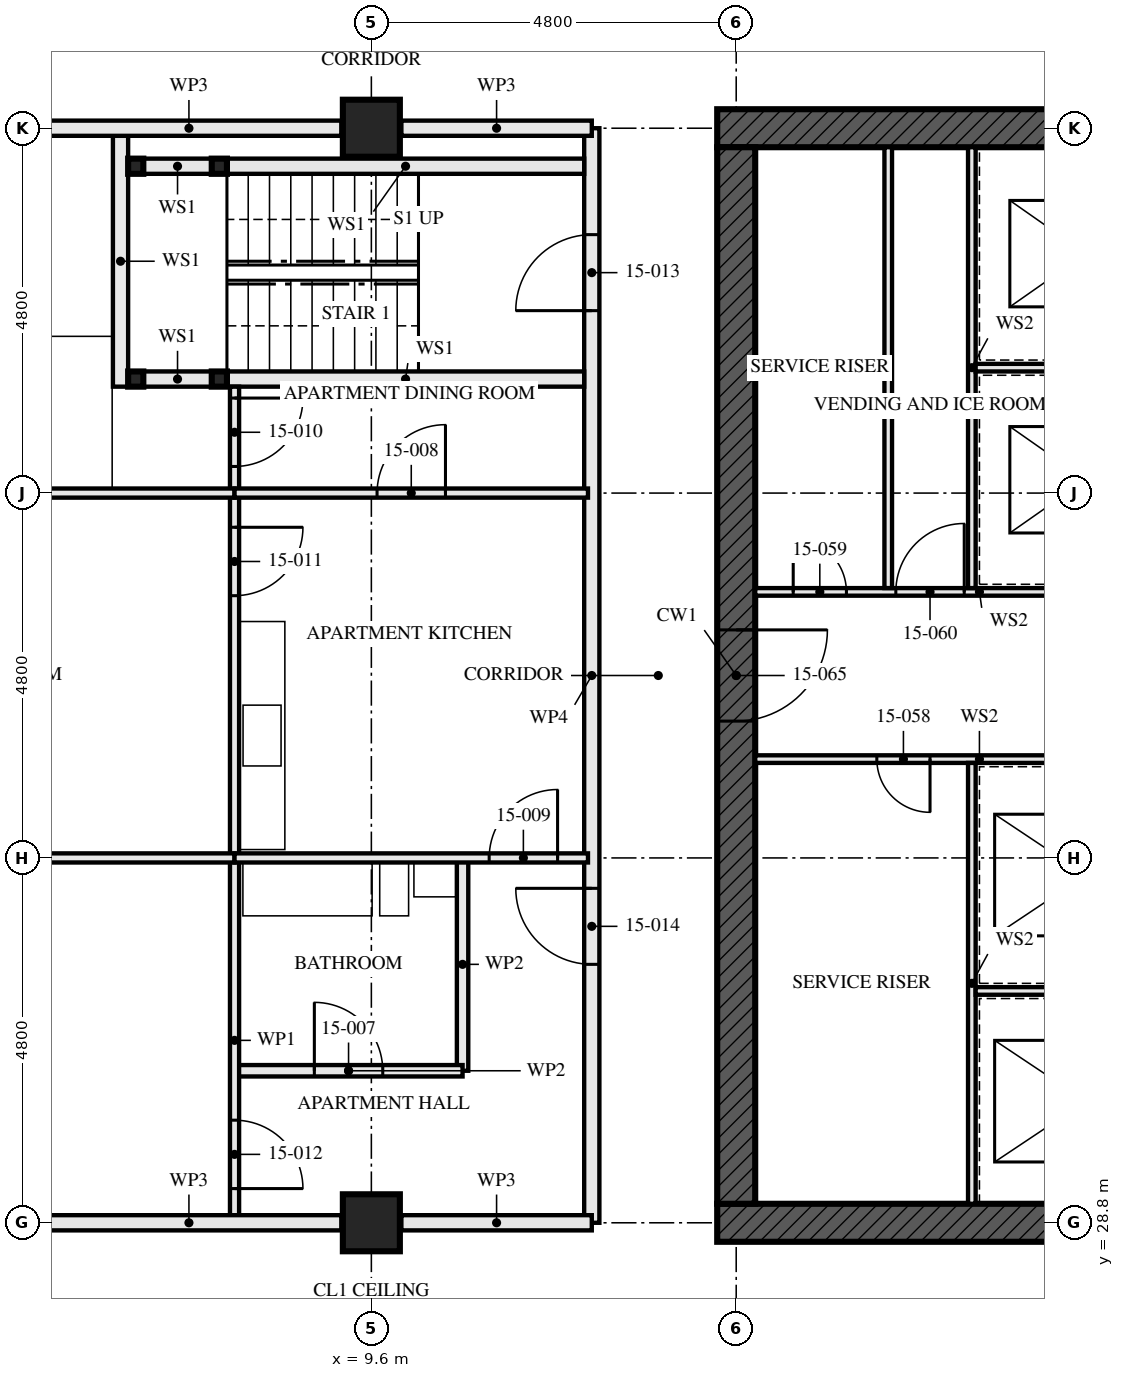
"""IFC4 building model, lengths in metres.
Left out: names, types, materials, properties, quantities, classifications, styles, units other than length and angle.
Written with IfcOpenShell. Run it as: python <this file> out.ifc"""

import sys

from ifc_helpers import new_model, si_unit, direction, frame, frame_2d, origin, origin_2d, place, context, subcontext, project, spatial, rectangle, hollow_rectangle, extrude, element, fill, save


model = new_model("IFC4")
c1 = context("Model", 3, precision=1e-05, world=origin(), true_north=direction((0.0, 1.0)))
c2 = subcontext(c1, "Body", "Model", "MODEL_VIEW")
j1 = project(units=[si_unit("LENGTHUNIT", "METRE"), si_unit("PLANEANGLEUNIT", "RADIAN")], contexts=[c1])
p1 = place(None, origin())
s1 = spatial("IfcSite", under=j1, at=p1, CompositionType="ELEMENT")
p2 = place(p1, origin())
s2 = spatial("IfcBuilding", under=s1, at=p2, CompositionType="ELEMENT")
p3 = place(p2, frame((0.0, 0.0, 58.5)))
s3 = spatial("IfcBuildingStorey", under=s2, at=p3, CompositionType="ELEMENT", Elevation=58.5)
for number, where, z_axis, x_axis in (
    (1, (9.6, 28.8, 0.0), (0.0, 0.0, 1.0), (0.0, 1.0, 0.0)),
    (2, (9.6, 43.2, 0.0), (0.0, 0.0, 1.0), (0.0, 1.0, 0.0)),
):
    element("IfcColumn", number, at=place(p3, frame(where, z_axis=z_axis, x_axis=x_axis)), inside=s3, PredefinedType="COLUMN", context=c2, shape_type="SweptSolid", body=[
        extrude(hollow_rectangle(XDim=0.75, YDim=0.75, WallThickness=0.08, at=origin_2d()), origin(), (0.0, 0.0, 1.0), 3.5),
    ])
p4 = place(p3, frame((14.15, 28.8, -0.17), z_axis=(0.0, 0.0, 1.0), x_axis=(1.0, 0.0, 0.0)))
e3 = element("IfcWall", 3, at=p4, inside=s3, PredefinedType="SHEAR", context=c2, shape_type="SweptSolid", body=[
    extrude(rectangle(XDim=14.9, YDim=0.5, at=frame_2d((7.45, 0.0))), origin(), (0.0, 0.0, 1.0), 3.5),
])
p5 = place(p4, frame((6.85, 0.0, 0.17)))
e4 = element("IfcOpeningElement", 4, at=p5, cuts=e3, PredefinedType="OPENING", context=c2, shape_type="SweptSolid", body=[
    extrude(rectangle(XDim=1.2, YDim=2.1, at=frame_2d((0.6, 1.05))), frame((0.0, 0.26, 0.0), z_axis=(0.0, -1.0, 0.0), x_axis=(1.0, 0.0, 0.0)), (0.0, 0.0, 1.0), 0.521),
])
p6 = place(p3, frame((29.05, 43.2, -0.17), z_axis=(0.0, 0.0, 1.0), x_axis=(-1.0, 0.0, 0.0)))
e5 = element("IfcWall", 5, at=p6, inside=s3, PredefinedType="SHEAR", context=c2, shape_type="SweptSolid", body=[
    extrude(rectangle(XDim=14.9, YDim=0.5, at=frame_2d((7.45, 0.0))), origin(), (0.0, 0.0, 1.0), 3.5),
])
p7 = place(p6, frame((6.85, 0.0, 0.17)))
e6 = element("IfcOpeningElement", 6, at=p7, cuts=e5, PredefinedType="OPENING", context=c2, shape_type="SweptSolid", body=[
    extrude(rectangle(XDim=1.2, YDim=2.1, at=frame_2d((0.6, 1.05))), frame((0.0, 0.26, 0.0), z_axis=(0.0, -1.0, 0.0), x_axis=(1.0, 0.0, 0.0)), (0.0, 0.0, 1.0), 0.521),
])
p8 = place(p3, frame((14.4, 42.95, -0.17), z_axis=(0.0, 0.0, 1.0), x_axis=(0.0, -1.0, 0.0)))
e7 = element("IfcWall", 7, at=p8, inside=s3, PredefinedType="SHEAR", context=c2, shape_type="SweptSolid", body=[
    extrude(rectangle(XDim=13.9, YDim=0.5, at=frame_2d((6.95, 0.0))), origin(), (0.0, 0.0, 1.0), 3.5),
])
p9 = place(p8, frame((6.35, 0.0, 0.17)))
e8 = element("IfcOpeningElement", 8, at=p9, cuts=e7, PredefinedType="OPENING", context=c2, shape_type="SweptSolid", body=[
    extrude(rectangle(XDim=1.2, YDim=2.1, at=frame_2d((0.6, 1.05))), frame((0.0, 0.26, 0.0), z_axis=(0.0, -1.0, 0.0), x_axis=(1.0, 0.0, 0.0)), (0.0, 0.0, 1.0), 0.521),
])
for number, where, z_axis, x_axis in (
    (9, (6.5, 42.7, 0.0), (0.0, 0.0, 1.0), (1.0, 0.0, 0.0)),
    (10, (6.5, 39.9, 0.0), (0.0, 0.0, 1.0), (1.0, 0.0, 0.0)),
    (11, (7.6, 42.7, 0.0), (0.0, 0.0, 1.0), (1.0, 0.0, 0.0)),
    (12, (7.6, 39.9, 0.0), (0.0, 0.0, 1.0), (1.0, 0.0, 0.0)),
):
    element("IfcColumn", number, at=place(p3, frame(where, z_axis=z_axis, x_axis=x_axis)), inside=s3, PredefinedType="COLUMN", context=c2, shape_type="SweptSolid", body=[
        extrude(hollow_rectangle(XDim=0.2, YDim=0.2, WallThickness=0.008, at=origin_2d()), origin(), (0.0, 0.0, 1.0), 3.33),
    ])
p10 = place(p3, frame((6.6, 42.7, 0.0), z_axis=(0.0, 0.0, 1.0), x_axis=(1.0, 0.0, 0.0)))
e13 = element("IfcWall", 13, at=p10, inside=s3, PredefinedType="SOLIDWALL", context=c2, shape_type="SweptSolid", body=[
    extrude(rectangle(XDim=0.9, YDim=0.2, at=frame_2d((0.45, 0.0))), origin(), (0.0, 0.0, 1.0), 2.99),
])
p11 = place(p3, frame((7.7, 42.7, 0.0), z_axis=(0.0, 0.0, 1.0), x_axis=(1.0, 0.0, 0.0)))
e14 = element("IfcWall", 14, at=p11, inside=s3, PredefinedType="SOLIDWALL", context=c2, shape_type="SweptSolid", body=[
    extrude(rectangle(XDim=4.7, YDim=0.2, at=frame_2d((2.35, 0.0))), origin(), (0.0, 0.0, 1.0), 2.99),
])
p12 = place(p3, frame((6.6, 39.9, 0.0), z_axis=(0.0, 0.0, 1.0), x_axis=(1.0, 0.0, 0.0)))
e15 = element("IfcWall", 15, at=p12, inside=s3, PredefinedType="SOLIDWALL", context=c2, shape_type="SweptSolid", body=[
    extrude(rectangle(XDim=0.9, YDim=0.2, at=frame_2d((0.45, 0.0))), origin(), (0.0, 0.0, 1.0), 2.99),
])
p13 = place(p3, frame((7.7, 39.9, 0.0), z_axis=(0.0, 0.0, 1.0), x_axis=(1.0, 0.0, 0.0)))
e16 = element("IfcWall", 16, at=p13, inside=s3, PredefinedType="SOLIDWALL", context=c2, shape_type="SweptSolid", body=[
    extrude(rectangle(XDim=4.7, YDim=0.2, at=frame_2d((2.35, 0.0))), origin(), (0.0, 0.0, 1.0), 2.99),
])
p14 = place(p3, frame((6.3, 43.1, 0.0), z_axis=(0.0, 0.0, 1.0), x_axis=(0.0, -1.0, 0.0)))
e17 = element("IfcWall", 17, at=p14, inside=s3, PredefinedType="SOLIDWALL", context=c2, shape_type="SweptSolid", body=[
    extrude(rectangle(XDim=3.3, YDim=0.2, at=frame_2d((1.65, 0.0))), origin(), (0.0, 0.0, 1.0), 3.33),
])
p15 = place(p3, frame((7.8, 30.8, 0.0), z_axis=(0.0, 0.0, 1.0), x_axis=(1.0, 0.0, 0.0)))
e18 = element("IfcWall", 18, at=p15, inside=s3, PredefinedType="PARTITIONING", context=c2, shape_type="SweptSolid", body=[
    extrude(rectangle(XDim=3.0, YDim=0.15, at=frame_2d((1.5, 0.0))), origin(), (0.0, 0.0, 1.0), 3.33),
])
p16 = place(p15, frame((1.05, 0.0, 0.0)))
e19 = element("IfcOpeningElement", 19, at=p16, cuts=e18, PredefinedType="OPENING", context=c2, shape_type="SweptSolid", body=[
    extrude(rectangle(XDim=0.9, YDim=2.1, at=frame_2d((0.45, 1.05))), frame((0.0, 0.085, 0.0), z_axis=(0.0, -1.0, 0.0), x_axis=(1.0, 0.0, 0.0)), (0.0, 0.0, 1.0), 0.171),
])
p17 = place(p3, frame((10.8, 33.6, 0.0), z_axis=(0.0, 0.0, 1.0), x_axis=(0.0, -1.0, 0.0)))
e20 = element("IfcWall", 20, at=p17, inside=s3, PredefinedType="PARTITIONING", context=c2, shape_type="SweptSolid", body=[
    extrude(rectangle(XDim=2.8, YDim=0.15, at=frame_2d((1.4, 0.0))), origin(), (0.0, 0.0, 1.0), 3.33),
])
p18 = place(p3, frame((7.8, 38.4, 0.0), z_axis=(0.0, 0.0, 1.0), x_axis=(1.0, 0.0, 0.0)))
e21 = element("IfcWall", 21, at=p18, inside=s3, PredefinedType="PARTITIONING", context=c2, shape_type="SweptSolid", body=[
    extrude(rectangle(XDim=4.65, YDim=0.12, at=frame_2d((2.325, 0.0))), origin(), (0.0, 0.0, 1.0), 2.55),
])
p19 = place(p18, frame((1.875, 0.0, 0.0)))
e22 = element("IfcOpeningElement", 22, at=p19, cuts=e21, PredefinedType="OPENING", context=c2, shape_type="SweptSolid", body=[
    extrude(rectangle(XDim=0.9, YDim=2.1, at=frame_2d((0.45, 1.05))), frame((0.0, 0.071, 0.0), z_axis=(0.0, -1.0, 0.0), x_axis=(1.0, 0.0, 0.0)), (0.0, 0.0, 1.0), 0.141),
])
p20 = place(p3, frame((7.8, 33.6, 0.0), z_axis=(0.0, 0.0, 1.0), x_axis=(1.0, 0.0, 0.0)))
e23 = element("IfcWall", 23, at=p20, inside=s3, PredefinedType="PARTITIONING", context=c2, shape_type="SweptSolid", body=[
    extrude(rectangle(XDim=4.65, YDim=0.12, at=frame_2d((2.325, 0.0))), origin(), (0.0, 0.0, 1.0), 2.55),
])
p21 = place(p20, frame((3.35, 0.0, 0.0)))
e24 = element("IfcOpeningElement", 24, at=p21, cuts=e23, PredefinedType="OPENING", context=c2, shape_type="SweptSolid", body=[
    extrude(rectangle(XDim=0.9, YDim=2.1, at=frame_2d((0.45, 1.05))), frame((0.0, 0.071, 0.0), z_axis=(0.0, -1.0, 0.0), x_axis=(1.0, 0.0, 0.0)), (0.0, 0.0, 1.0), 0.141),
])
p22 = place(p3, frame((7.8, 39.8, 0.0), z_axis=(0.0, 0.0, 1.0), x_axis=(0.0, -1.0, 0.0)))
e25 = element("IfcWall", 25, at=p22, inside=s3, PredefinedType="PARTITIONING", context=c2, shape_type="SweptSolid", body=[
    extrude(rectangle(XDim=1.4, YDim=0.12, at=frame_2d((0.7, 0.0))), origin(), (0.0, 0.0, 1.0), 3.33),
])
p23 = place(p22, frame((0.15, 0.0, 0.0)))
e26 = element("IfcOpeningElement", 26, at=p23, cuts=e25, PredefinedType="OPENING", context=c2, shape_type="SweptSolid", body=[
    extrude(rectangle(XDim=0.9, YDim=2.1, at=frame_2d((0.45, 1.05))), frame((0.0, 0.071, 0.0), z_axis=(0.0, -1.0, 0.0), x_axis=(1.0, 0.0, 0.0)), (0.0, 0.0, 1.0), 0.141),
])
p24 = place(p3, frame((7.8, 38.4, 0.0), z_axis=(0.0, 0.0, 1.0), x_axis=(0.0, -1.0, 0.0)))
e27 = element("IfcWall", 27, at=p24, inside=s3, PredefinedType="PARTITIONING", context=c2, shape_type="SweptSolid", body=[
    extrude(rectangle(XDim=4.8, YDim=0.12, at=frame_2d((2.4, 0.0))), origin(), (0.0, 0.0, 1.0), 3.33),
])
p25 = place(p24, frame((0.45, 0.0, 0.0)))
e28 = element("IfcOpeningElement", 28, at=p25, cuts=e27, PredefinedType="OPENING", context=c2, shape_type="SweptSolid", body=[
    extrude(rectangle(XDim=0.9, YDim=2.1, at=frame_2d((0.45, 1.05))), frame((0.0, 0.071, 0.0), z_axis=(0.0, -1.0, 0.0), x_axis=(1.0, 0.0, 0.0)), (0.0, 0.0, 1.0), 0.141),
])
p26 = place(p3, frame((7.8, 33.6, 0.0), z_axis=(0.0, 0.0, 1.0), x_axis=(0.0, -1.0, 0.0)))
e29 = element("IfcWall", 29, at=p26, inside=s3, PredefinedType="PARTITIONING", context=c2, shape_type="SweptSolid", body=[
    extrude(rectangle(XDim=4.8, YDim=0.12, at=frame_2d((2.4, 0.0))), origin(), (0.0, 0.0, 1.0), 3.33),
])
p27 = place(p26, frame((3.45, 0.0, 0.0)))
e30 = element("IfcOpeningElement", 30, at=p27, cuts=e29, PredefinedType="OPENING", context=c2, shape_type="SweptSolid", body=[
    extrude(rectangle(XDim=0.9, YDim=2.1, at=frame_2d((0.45, 1.05))), frame((0.0, 0.071, 0.0), z_axis=(0.0, -1.0, 0.0), x_axis=(1.0, 0.0, 0.0)), (0.0, 0.0, 1.0), 0.141),
])
for number, where, z_axis, x_axis in (
    (31, (0.395, 38.4, 0.0), (0.0, 0.0, 1.0), (1.0, 0.0, 0.0)),
    (32, (0.395, 33.6, 0.0), (0.0, 0.0, 1.0), (1.0, 0.0, 0.0)),
):
    element("IfcWall", number, at=place(p3, frame(where, z_axis=z_axis, x_axis=x_axis)), inside=s3, PredefinedType="PARTITIONING", context=c2, shape_type="SweptSolid", body=[
        extrude(rectangle(XDim=7.405, YDim=0.12, at=frame_2d((3.703, 0.0))), origin(), (0.0, 0.0, 1.0), 2.55),
    ])
p28 = place(p3, frame((12.5, 43.2, 0.0), z_axis=(0.0, 0.0, 1.0), x_axis=(0.0, -1.0, 0.0)))
e33 = element("IfcWall", 33, at=p28, inside=s3, PredefinedType="PARTITIONING", context=c2, shape_type="SweptSolid", body=[
    extrude(rectangle(XDim=14.4, YDim=0.2, at=frame_2d((7.2, 0.0))), origin(), (0.0, 0.0, 1.0), 2.55),
])
p29 = place(p28, frame((1.4, 0.0, 0.0)))
e34 = element("IfcOpeningElement", 34, at=p29, cuts=e33, PredefinedType="OPENING", context=c2, shape_type="SweptSolid", body=[
    extrude(rectangle(XDim=1.0, YDim=2.1, at=frame_2d((0.5, 1.05))), frame((0.0, 0.111, 0.0), z_axis=(0.0, -1.0, 0.0), x_axis=(1.0, 0.0, 0.0)), (0.0, 0.0, 1.0), 0.221),
])
p30 = place(p28, frame((10.0, 0.0, 0.0)))
e35 = element("IfcOpeningElement", 35, at=p30, cuts=e33, PredefinedType="OPENING", context=c2, shape_type="SweptSolid", body=[
    extrude(rectangle(XDim=1.0, YDim=2.1, at=frame_2d((0.5, 1.05))), frame((0.0, 0.111, 0.0), z_axis=(0.0, -1.0, 0.0), x_axis=(1.0, 0.0, 0.0)), (0.0, 0.0, 1.0), 0.221),
])
p31 = place(p3, frame((16.4, 37.15, 0.0), z_axis=(0.0, 0.0, 1.0), x_axis=(0.0, 1.0, 0.0)))
e36 = element("IfcWall", 36, at=p31, inside=s3, PredefinedType="SOLIDWALL", context=c2, shape_type="SweptSolid", body=[
    extrude(rectangle(XDim=5.8, YDim=0.1, at=frame_2d((2.9, 0.0))), origin(), (0.0, 0.0, 1.0), 3.33),
])
p32 = place(p3, frame((14.65, 34.9, 0.0), z_axis=(0.0, 0.0, 1.0), x_axis=(1.0, 0.0, 0.0)))
e37 = element("IfcWall", 37, at=p32, inside=s3, PredefinedType="SOLIDWALL", context=c2, shape_type="SweptSolid", body=[
    extrude(rectangle(XDim=5.9, YDim=0.1, at=frame_2d((2.95, 0.0))), origin(), (0.0, 0.0, 1.0), 3.33),
])
p33 = place(p32, frame((1.6, 0.0, 0.0)))
e38 = element("IfcOpeningElement", 38, at=p33, cuts=e37, PredefinedType="OPENING", context=c2, shape_type="SweptSolid", body=[
    extrude(rectangle(XDim=0.7, YDim=2.1, at=frame_2d((0.35, 1.05))), frame((0.0, 0.061, 0.0), z_axis=(0.0, -1.0, 0.0), x_axis=(1.0, 0.0, 0.0)), (0.0, 0.0, 1.0), 0.121),
])
p34 = place(p3, frame((14.65, 37.1, 0.0), z_axis=(0.0, 0.0, 1.0), x_axis=(1.0, 0.0, 0.0)))
e39 = element("IfcWall", 39, at=p34, inside=s3, PredefinedType="SOLIDWALL", context=c2, shape_type="SweptSolid", body=[
    extrude(rectangle(XDim=5.9, YDim=0.1, at=frame_2d((2.95, 0.0))), origin(), (0.0, 0.0, 1.0), 3.33),
])
p35 = place(p34, frame((0.5, 0.0, 0.0)))
e40 = element("IfcOpeningElement", 40, at=p35, cuts=e39, PredefinedType="OPENING", context=c2, shape_type="SweptSolid", body=[
    extrude(rectangle(XDim=0.7, YDim=2.1, at=frame_2d((0.35, 1.05))), frame((0.0, 0.061, 0.0), z_axis=(0.0, -1.0, 0.0), x_axis=(1.0, 0.0, 0.0)), (0.0, 0.0, 1.0), 0.121),
])
p36 = place(p34, frame((1.85, 0.0, 0.0)))
e41 = element("IfcOpeningElement", 41, at=p36, cuts=e39, PredefinedType="OPENING", context=c2, shape_type="SweptSolid", body=[
    extrude(rectangle(XDim=0.9, YDim=2.1, at=frame_2d((0.45, 1.05))), frame((0.0, 0.061, 0.0), z_axis=(0.0, -1.0, 0.0), x_axis=(1.0, 0.0, 0.0)), (0.0, 0.0, 1.0), 0.121),
])
p37 = place(p3, frame((17.5, 29.05, 0.0), z_axis=(0.0, 0.0, 1.0), x_axis=(0.0, 1.0, 0.0)))
e42 = element("IfcWall", 42, at=p37, inside=s3, PredefinedType="SOLIDWALL", context=c2, shape_type="SweptSolid", body=[
    extrude(rectangle(XDim=5.8, YDim=0.1, at=frame_2d((2.9, 0.0))), origin(), (0.0, 0.0, 1.0), 3.33),
])
p38 = place(p3, frame((17.55, 31.85, 0.0), z_axis=(0.0, 0.0, 1.0), x_axis=(1.0, 0.0, 0.0)))
e43 = element("IfcWall", 43, at=p38, inside=s3, PredefinedType="SOLIDWALL", context=c2, shape_type="SweptSolid", body=[
    extrude(rectangle(XDim=2.9, YDim=0.1, at=frame_2d((1.45, 0.0))), origin(), (0.0, 0.0, 1.0), 3.33),
])
p39 = place(p3, frame((17.5, 37.15, 0.0), z_axis=(0.0, 0.0, 1.0), x_axis=(0.0, 1.0, 0.0)))
e44 = element("IfcWall", 44, at=p39, inside=s3, PredefinedType="SOLIDWALL", context=c2, shape_type="SweptSolid", body=[
    extrude(rectangle(XDim=5.8, YDim=0.1, at=frame_2d((2.9, 0.0))), origin(), (0.0, 0.0, 1.0), 3.33),
])
p40 = place(p3, frame((17.55, 40.05, 0.0), z_axis=(0.0, 0.0, 1.0), x_axis=(1.0, 0.0, 0.0)))
e45 = element("IfcWall", 45, at=p40, inside=s3, PredefinedType="SOLIDWALL", context=c2, shape_type="SweptSolid", body=[
    extrude(rectangle(XDim=2.9, YDim=0.1, at=frame_2d((1.45, 0.0))), origin(), (0.0, 0.0, 1.0), 3.33),
])
p41 = place(p3, frame((12.5, 28.8, 0.0), z_axis=(0.0, 0.0, 1.0), x_axis=(-1.0, 0.0, 0.0)))
e46 = element("IfcWall", 46, at=p41, inside=s3, PredefinedType="PARTITIONING", context=c2, shape_type="SweptSolid", body=[
    extrude(rectangle(XDim=2.505, YDim=0.2, at=frame_2d((1.252, 0.0))), origin(), (0.0, 0.0, 1.0), 2.32),
])
p42 = place(p3, frame((9.205, 28.8, 0.0), z_axis=(0.0, 0.0, 1.0), x_axis=(-1.0, 0.0, 0.0)))
e47 = element("IfcWall", 47, at=p42, inside=s3, PredefinedType="PARTITIONING", context=c2, shape_type="SweptSolid", body=[
    extrude(rectangle(XDim=4.01, YDim=0.2, at=frame_2d((2.005, 0.0))), origin(), (0.0, 0.0, 1.0), 2.32),
])
p43 = place(p3, frame((12.5, 43.2, 0.0), z_axis=(0.0, 0.0, 1.0), x_axis=(-1.0, 0.0, 0.0)))
e48 = element("IfcWall", 48, at=p43, inside=s3, PredefinedType="PARTITIONING", context=c2, shape_type="SweptSolid", body=[
    extrude(rectangle(XDim=2.505, YDim=0.2, at=frame_2d((1.252, 0.0))), origin(), (0.0, 0.0, 1.0), 2.32),
])
p44 = place(p3, frame((9.205, 43.2, 0.0), z_axis=(0.0, 0.0, 1.0), x_axis=(-1.0, 0.0, 0.0)))
e49 = element("IfcWall", 49, at=p44, inside=s3, PredefinedType="PARTITIONING", context=c2, shape_type="SweptSolid", body=[
    extrude(rectangle(XDim=4.01, YDim=0.2, at=frame_2d((2.005, 0.0))), origin(), (0.0, 0.0, 1.0), 2.32),
])
p45 = place(p16, origin())
e50 = element("IfcDoor", 50, at=p45, inside=s3, OperationType="SINGLE_SWING_RIGHT", PredefinedType="DOOR", context=c2, shape_type="SweptSolid", body=[
    extrude(rectangle(XDim=0.9, YDim=2.1, at=frame_2d((0.45, 1.05))), frame((0.0, 0.022, 0.0), z_axis=(0.0, -1.0, 0.0), x_axis=(1.0, 0.0, 0.0)), (0.0, 0.0, 1.0), 0.044),
])
fill(e19, e50)
p46 = place(p19, origin())
e51 = element("IfcDoor", 51, at=p46, inside=s3, OperationType="SINGLE_SWING_LEFT", PredefinedType="DOOR", context=c2, shape_type="SweptSolid", body=[
    extrude(rectangle(XDim=0.9, YDim=2.1, at=frame_2d((0.45, 1.05))), frame((0.0, 0.022, 0.0), z_axis=(0.0, -1.0, 0.0), x_axis=(1.0, 0.0, 0.0)), (0.0, 0.0, 1.0), 0.044),
])
fill(e22, e51)
p47 = place(p21, origin())
e52 = element("IfcDoor", 52, at=p47, inside=s3, OperationType="SINGLE_SWING_LEFT", PredefinedType="DOOR", context=c2, shape_type="SweptSolid", body=[
    extrude(rectangle(XDim=0.9, YDim=2.1, at=frame_2d((0.45, 1.05))), frame((0.0, 0.022, 0.0), z_axis=(0.0, -1.0, 0.0), x_axis=(1.0, 0.0, 0.0)), (0.0, 0.0, 1.0), 0.044),
])
fill(e24, e52)
p48 = place(p23, origin())
e53 = element("IfcDoor", 53, at=p48, inside=s3, OperationType="SINGLE_SWING_RIGHT", PredefinedType="DOOR", context=c2, shape_type="SweptSolid", body=[
    extrude(rectangle(XDim=0.9, YDim=2.1, at=frame_2d((0.45, 1.05))), frame((0.0, 0.022, 0.0), z_axis=(0.0, -1.0, 0.0), x_axis=(1.0, 0.0, 0.0)), (0.0, 0.0, 1.0), 0.044),
])
fill(e26, e53)
p49 = place(p25, origin())
e54 = element("IfcDoor", 54, at=p49, inside=s3, OperationType="SINGLE_SWING_RIGHT", PredefinedType="DOOR", context=c2, shape_type="SweptSolid", body=[
    extrude(rectangle(XDim=0.9, YDim=2.1, at=frame_2d((0.45, 1.05))), frame((0.0, 0.022, 0.0), z_axis=(0.0, -1.0, 0.0), x_axis=(1.0, 0.0, 0.0)), (0.0, 0.0, 1.0), 0.044),
])
fill(e28, e54)
p50 = place(p27, origin())
e55 = element("IfcDoor", 55, at=p50, inside=s3, OperationType="SINGLE_SWING_LEFT", PredefinedType="DOOR", context=c2, shape_type="SweptSolid", body=[
    extrude(rectangle(XDim=0.9, YDim=2.1, at=frame_2d((0.45, 1.05))), frame((0.0, 0.022, 0.0), z_axis=(0.0, -1.0, 0.0), x_axis=(1.0, 0.0, 0.0)), (0.0, 0.0, 1.0), 0.044),
])
fill(e30, e55)
p51 = place(p29, frame((1.0, 0.0, 0.0), z_axis=(0.0, 0.0, 1.0), x_axis=(-1.0, 0.0, 0.0)))
e56 = element("IfcDoor", 56, at=p51, inside=s3, OperationType="SINGLE_SWING_RIGHT", PredefinedType="DOOR", context=c2, shape_type="SweptSolid", body=[
    extrude(rectangle(XDim=1.0, YDim=2.1, at=frame_2d((0.5, 1.05))), frame((0.0, 0.032, 0.0), z_axis=(0.0, -1.0, 0.0), x_axis=(1.0, 0.0, 0.0)), (0.0, 0.0, 1.0), 0.064),
])
fill(e34, e56)
p52 = place(p30, frame((1.0, 0.0, 0.0), z_axis=(0.0, 0.0, 1.0), x_axis=(-1.0, 0.0, 0.0)))
e57 = element("IfcDoor", 57, at=p52, inside=s3, OperationType="SINGLE_SWING_LEFT", PredefinedType="DOOR", context=c2, shape_type="SweptSolid", body=[
    extrude(rectangle(XDim=1.0, YDim=2.1, at=frame_2d((0.5, 1.05))), frame((0.0, 0.027, 0.0), z_axis=(0.0, -1.0, 0.0), x_axis=(1.0, 0.0, 0.0)), (0.0, 0.0, 1.0), 0.054),
])
fill(e35, e57)
p53 = place(p33, frame((0.7, 0.0, 0.0), z_axis=(0.0, 0.0, 1.0), x_axis=(-1.0, 0.0, 0.0)))
e58 = element("IfcDoor", 58, at=p53, inside=s3, OperationType="SINGLE_SWING_RIGHT", PredefinedType="DOOR", context=c2, shape_type="SweptSolid", body=[
    extrude(rectangle(XDim=0.7, YDim=2.1, at=frame_2d((0.35, 1.05))), frame((0.0, 0.027, 0.0), z_axis=(0.0, -1.0, 0.0), x_axis=(1.0, 0.0, 0.0)), (0.0, 0.0, 1.0), 0.054),
])
fill(e38, e58)
p54 = place(p35, origin())
e59 = element("IfcDoor", 59, at=p54, inside=s3, OperationType="SINGLE_SWING_RIGHT", PredefinedType="DOOR", context=c2, shape_type="SweptSolid", body=[
    extrude(rectangle(XDim=0.7, YDim=2.1, at=frame_2d((0.35, 1.05))), frame((0.0, 0.027, 0.0), z_axis=(0.0, -1.0, 0.0), x_axis=(1.0, 0.0, 0.0)), (0.0, 0.0, 1.0), 0.054),
])
fill(e40, e59)
p55 = place(p36, origin())
e60 = element("IfcDoor", 60, at=p55, inside=s3, OperationType="SINGLE_SWING_LEFT", PredefinedType="DOOR", context=c2, shape_type="SweptSolid", body=[
    extrude(rectangle(XDim=0.9, YDim=2.1, at=frame_2d((0.45, 1.05))), frame((0.0, 0.027, 0.0), z_axis=(0.0, -1.0, 0.0), x_axis=(1.0, 0.0, 0.0)), (0.0, 0.0, 1.0), 0.054),
])
fill(e41, e60)
p56 = place(p9, origin())
e61 = element("IfcDoor", 61, at=p56, inside=s3, OperationType="SINGLE_SWING_LEFT", PredefinedType="DOOR", context=c2, shape_type="SweptSolid", body=[
    extrude(rectangle(XDim=1.2, YDim=2.1, at=frame_2d((0.6, 1.05))), frame((0.0, 0.027, 0.0), z_axis=(0.0, -1.0, 0.0), x_axis=(1.0, 0.0, 0.0)), (0.0, 0.0, 1.0), 0.054),
])
fill(e8, e61)
save(model, sys.argv[1])
